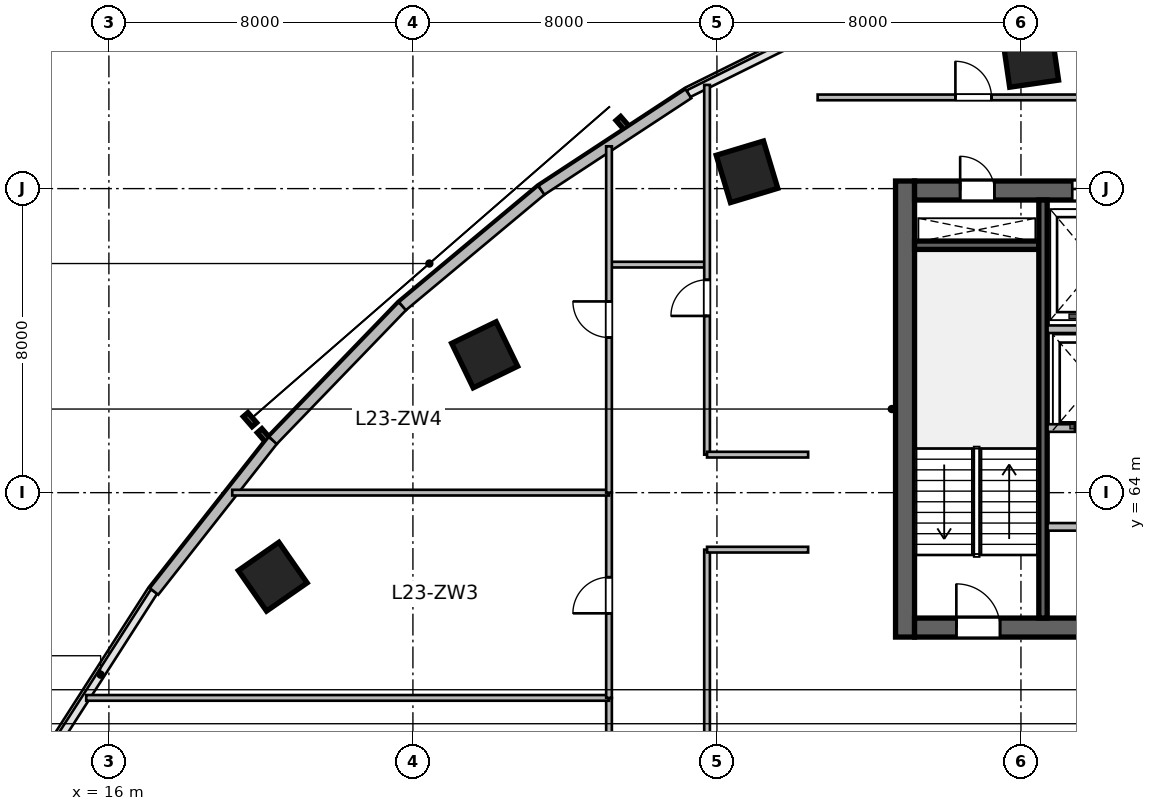
"""IFC4 building model, lengths in metres.
Left out: names, types, materials, properties, quantities, classifications, styles, units other than length and angle.
Written with IfcOpenShell. Run it as: python <this file> out.ifc"""

import sys

from ifc_helpers import new_model, si_unit, direction, frame, frame_2d, origin, origin_2d, place, context, subcontext, project, spatial, rectangle, extrude, source, transform, mapped, element, fill, save


model = new_model("IFC4")
c1 = context("Model", 3, precision=1e-05, world=origin(), true_north=direction((0.0, 1.0)))
c2 = subcontext(c1, "Body", "Model", "MODEL_VIEW")
j1 = project(units=[si_unit("LENGTHUNIT", "METRE"), si_unit("PLANEANGLEUNIT", "RADIAN")], contexts=[c1])
p1 = place(None, origin())
s1 = spatial("IfcSite", under=j1, at=p1, CompositionType="ELEMENT")
p2 = place(p1, origin())
s2 = spatial("IfcBuilding", under=s1, at=p2, CompositionType="ELEMENT")
p3 = place(p2, frame((0.0, 0.0, 99.9)))
s3 = spatial("IfcBuildingStorey", under=s2, at=p3, CompositionType="ELEMENT", Elevation=99.9)
m1 = source(origin(), c2, "Body", "SweptSolid", [
    extrude(rectangle(XDim=12.0, YDim=0.5, at=frame_2d((6.0, 0.0))), origin(), (0.0, 0.0, 1.0), 3.9),
])
p4 = place(p3, frame((36.95, 60.2, 0.0), z_axis=(0.0, 0.0, 1.0), x_axis=(0.0, 1.0, 0.0)))
e1 = element("IfcWall", 1, at=p4, inside=s3, PredefinedType="SHEAR", context=c2, shape_type="MappedRepresentation", body=[
    mapped(m1, transform((0.0, 0.0, 0.0), scale=1.0)),
])
m2 = source(origin(), c2, "Body", "SweptSolid", [
    extrude(rectangle(XDim=21.6, YDim=0.5, at=frame_2d((10.8, 0.0))), origin(), (0.0, 0.0, 1.0), 3.9),
])
p5 = place(p3, frame((37.2, 60.45, 0.0), z_axis=(0.0, 0.0, 1.0), x_axis=(1.0, 0.0, 0.0)))
e2 = element("IfcWall", 2, at=p5, inside=s3, PredefinedType="SHEAR", context=c2, shape_type="MappedRepresentation", body=[
    mapped(m2, transform((0.0, 0.0, 0.0), scale=1.0)),
])
p6 = place(p5, frame((1.1, 0.0, 0.0)))
e3 = element("IfcOpeningElement", 3, at=p6, cuts=e2, PredefinedType="OPENING", context=c2, shape_type="SweptSolid", body=[
    extrude(rectangle(XDim=1.15, YDim=2.15, at=frame_2d((0.575, 1.075))), frame((0.0, 0.26, 0.0), z_axis=(0.0, -1.0, 0.0), x_axis=(1.0, 0.0, 0.0)), (0.0, 0.0, 1.0), 0.52),
])
p7 = place(p5, frame((19.5, 0.0, 0.0)))
e4 = element("IfcOpeningElement", 4, at=p7, cuts=e2, PredefinedType="OPENING", context=c2, shape_type="SweptSolid", body=[
    extrude(rectangle(XDim=0.9, YDim=2.1, at=frame_2d((0.45, 1.05))), frame((0.0, 0.26, 0.0), z_axis=(0.0, -1.0, 0.0), x_axis=(1.0, 0.0, 0.0)), (0.0, 0.0, 1.0), 0.52),
])
p8 = place(p5, frame((12.02, 0.0, 0.0)))
e5 = element("IfcOpeningElement", 5, at=p8, cuts=e2, PredefinedType="OPENING", context=c2, shape_type="SweptSolid", body=[
    extrude(rectangle(XDim=1.6, YDim=2.15, at=frame_2d((0.8, 1.075))), frame((0.0, 0.26, 0.0), z_axis=(0.0, -1.0, 0.0), x_axis=(1.0, 0.0, 0.0)), (0.0, 0.0, 1.0), 0.52),
])
p9 = place(p3, frame((37.2, 71.95, 0.0), z_axis=(0.0, 0.0, 1.0), x_axis=(1.0, 0.0, 0.0)))
e6 = element("IfcWall", 6, at=p9, inside=s3, PredefinedType="SHEAR", context=c2, shape_type="MappedRepresentation", body=[
    mapped(m2, transform((0.0, 0.0, 0.0), scale=1.0)),
])
p10 = place(p9, frame((1.2, 0.0, 0.0)))
e7 = element("IfcOpeningElement", 7, at=p10, cuts=e6, PredefinedType="OPENING", context=c2, shape_type="SweptSolid", body=[
    extrude(rectangle(XDim=0.9, YDim=2.1, at=frame_2d((0.45, 1.05))), frame((0.0, 0.26, 0.0), z_axis=(0.0, -1.0, 0.0), x_axis=(1.0, 0.0, 0.0)), (0.0, 0.0, 1.0), 0.52),
])
p11 = place(p9, frame((14.7, 0.0, 0.0)))
e8 = element("IfcOpeningElement", 8, at=p11, cuts=e6, PredefinedType="OPENING", context=c2, shape_type="SweptSolid", body=[
    extrude(rectangle(XDim=1.2, YDim=2.15, at=frame_2d((0.6, 1.075))), frame((0.0, 0.26, 0.0), z_axis=(0.0, -1.0, 0.0), x_axis=(1.0, 0.0, 0.0)), (0.0, 0.0, 1.0), 0.52),
])
p12 = place(p9, frame((4.15, 0.0, 0.0)))
e9 = element("IfcOpeningElement", 9, at=p12, cuts=e6, PredefinedType="OPENING", context=c2, shape_type="SweptSolid", body=[
    extrude(rectangle(XDim=1.3, YDim=2.15, at=frame_2d((0.65, 1.075))), frame((0.0, 0.26, 0.0), z_axis=(0.0, -1.0, 0.0), x_axis=(1.0, 0.0, 0.0)), (0.0, 0.0, 1.0), 0.52),
])
p13 = place(p9, frame((7.1, 0.0, 0.0)))
e10 = element("IfcOpeningElement", 10, at=p13, cuts=e6, PredefinedType="OPENING", context=c2, shape_type="SweptSolid", body=[
    extrude(rectangle(XDim=0.9, YDim=2.1, at=frame_2d((0.45, 1.05))), frame((0.0, 0.26, 0.0), z_axis=(0.0, -1.0, 0.0), x_axis=(1.0, 0.0, 0.0)), (0.0, 0.0, 1.0), 0.52),
])
m3 = source(origin(), c2, "Body", "SweptSolid", [
    extrude(rectangle(XDim=3.27, YDim=0.22, at=frame_2d((1.635, 0.0))), origin(), (0.0, 0.0, 1.0), 3.9),
])
p14 = place(p3, frame((37.2, 70.51, 0.0), z_axis=(0.0, 0.0, 1.0), x_axis=(1.0, 0.0, 0.0)))
e11 = element("IfcWall", 11, at=p14, inside=s3, PredefinedType="SHEAR", context=c2, shape_type="MappedRepresentation", body=[
    mapped(m3, transform((0.0, 0.0, 0.0), scale=1.0)),
])
m4 = source(origin(), c2, "Body", "SweptSolid", [
    extrude(rectangle(XDim=11.0, YDim=0.22, at=frame_2d((5.5, 0.0))), origin(), (0.0, 0.0, 1.0), 3.9),
])
p15 = place(p3, frame((40.58, 60.7, 0.0), z_axis=(0.0, 0.0, 1.0), x_axis=(0.0, 1.0, 0.0)))
e12 = element("IfcWall", 12, at=p15, inside=s3, PredefinedType="SHEAR", context=c2, shape_type="MappedRepresentation", body=[
    mapped(m4, transform((0.0, 0.0, 0.0), scale=1.0)),
])
m5 = source(origin(), c2, "Body", "SweptSolid", [
    extrude(rectangle(XDim=1.3, YDim=1.3, at=origin_2d()), origin(), (0.0, 0.0, 1.0), 3.9),
])
for number, where, z_axis, x_axis in (
    (13, (20.311, 61.789, 0.0), (0.0, 0.0, 1.0), (-0.571, 0.821, 0.0)),
    (14, (25.888, 67.627, 0.0), (0.0, 0.0, 1.0), (-0.436, 0.9, 0.0)),
    (15, (32.791, 72.442, 0.0), (0.0, 0.0, 1.0), (-0.289, 0.957, 0.0)),
    (16, (40.253, 75.404, 0.0), (0.0, 0.0, 1.0), (-0.143, 0.99, 0.0)),
):
    element("IfcColumn", number, at=place(p3, frame(where, z_axis=z_axis, x_axis=x_axis)), inside=s3, PredefinedType="COLUMN", context=c2, shape_type="MappedRepresentation", body=[
        mapped(m5, transform((0.0, 0.0, 0.0), scale=1.0)),
    ])
m6 = source(origin(), c2, "Body", "SweptSolid", [
    extrude(rectangle(XDim=5.058, YDim=0.28, at=frame_2d((2.529, 0.0))), origin(), (0.0, 0.0, 1.0), 3.65),
])
p16 = place(p3, frame((17.188, 61.4, 0.0), z_axis=(0.0, 0.0, 1.0), x_axis=(0.618145507434, 0.786063694391, 0.0)))
e17 = element("IfcWall", 17, at=p16, inside=s3, PredefinedType="SOLIDWALL", context=c2, shape_type="MappedRepresentation", body=[
    mapped(m6, transform((0.0, 0.0, 0.0), scale=1.0)),
])
m7 = source(origin(), c2, "Body", "SweptSolid", [
    extrude(rectangle(XDim=4.908, YDim=0.28, at=frame_2d((2.454, 0.0))), origin(), (0.0, 0.0, 1.0), 3.65),
])
p17 = place(p3, frame((20.315, 65.376, 0.0), z_axis=(0.0, 0.0, 1.0), x_axis=(0.694613154328, 0.719383462302, 0.0)))
e18 = element("IfcWall", 18, at=p17, inside=s3, PredefinedType="SOLIDWALL", context=c2, shape_type="MappedRepresentation", body=[
    mapped(m7, transform((0.0, 0.0, 0.0), scale=1.0)),
])
m8 = source(origin(), c2, "Body", "SweptSolid", [
    extrude(rectangle(XDim=4.762, YDim=0.28, at=frame_2d((2.381, 0.0))), origin(), (0.0, 0.0, 1.0), 3.65),
])
p18 = place(p3, frame((23.725, 68.907, 0.0), z_axis=(0.0, 0.0, 1.0), x_axis=(0.767952279762, 0.640507061638, 0.0)))
e19 = element("IfcWall", 19, at=p18, inside=s3, PredefinedType="SOLIDWALL", context=c2, shape_type="MappedRepresentation", body=[
    mapped(m8, transform((0.0, 0.0, 0.0), scale=1.0)),
])
m9 = source(origin(), c2, "Body", "SweptSolid", [
    extrude(rectangle(XDim=4.626, YDim=0.28, at=frame_2d((2.313, 0.0))), origin(), (0.0, 0.0, 1.0), 3.65),
])
p19 = place(p3, frame((27.382, 71.958, 0.0), z_axis=(0.0, 0.0, 1.0), x_axis=(0.83595938331, 0.548791316855, 0.0)))
e20 = element("IfcWall", 20, at=p19, inside=s3, PredefinedType="SOLIDWALL", context=c2, shape_type="MappedRepresentation", body=[
    mapped(m9, transform((0.0, 0.0, 0.0), scale=1.0)),
])
m10 = source(origin(), c2, "Body", "SweptSolid", [
    extrude(rectangle(XDim=8.8, YDim=0.2, at=frame_2d((4.4, 0.0))), origin(), (0.0, 0.0, 1.0), 3.65),
])
p20 = place(p3, frame((40.7, 68.3, 0.0), z_axis=(0.0, 0.0, 1.0), x_axis=(1.0, 0.0, 0.0)))
e21 = element("IfcWall", 21, at=p20, inside=s3, PredefinedType="SOLIDWALL", context=c2, shape_type="MappedRepresentation", body=[
    mapped(m10, transform((0.0, 0.0, 0.0), scale=1.0)),
])
m11 = source(origin(), c2, "Body", "SweptSolid", [
    extrude(rectangle(XDim=8.02, YDim=0.2, at=frame_2d((4.01, 0.0))), origin(), (0.0, 0.0, 1.0), 3.65),
])
p21 = place(p3, frame((40.7, 63.1, 0.0), z_axis=(0.0, 0.0, 1.0), x_axis=(1.0, 0.0, 0.0)))
e22 = element("IfcWall", 22, at=p21, inside=s3, PredefinedType="SOLIDWALL", context=c2, shape_type="MappedRepresentation", body=[
    mapped(m11, transform((0.0, 0.0, 0.0), scale=1.0)),
])
p22 = place(p21, frame((3.4, 0.0, 0.0)))
e23 = element("IfcOpeningElement", 23, at=p22, cuts=e22, PredefinedType="OPENING", context=c2, shape_type="SweptSolid", body=[
    extrude(rectangle(XDim=0.95, YDim=2.15, at=frame_2d((0.475, 1.075))), frame((0.0, 0.11, 0.0), z_axis=(0.0, -1.0, 0.0), x_axis=(1.0, 0.0, 0.0)), (0.0, 0.0, 1.0), 0.22),
])
p23 = place(p3, frame((40.7, 65.7, 0.0), z_axis=(0.0, 0.0, 1.0), x_axis=(1.0, 0.0, 0.0)))
e24 = element("IfcWall", 24, at=p23, inside=s3, PredefinedType="SOLIDWALL", context=c2, shape_type="MappedRepresentation", body=[
    mapped(m10, transform((0.0, 0.0, 0.0), scale=1.0)),
])
p24 = place(p23, frame((0.72, 0.0, 0.0)))
e25 = element("IfcOpeningElement", 25, at=p24, cuts=e24, PredefinedType="OPENING", context=c2, shape_type="SweptSolid", body=[
    extrude(rectangle(XDim=1.0, YDim=2.15, at=frame_2d((0.5, 1.075))), frame((0.0, 0.11, 0.0), z_axis=(0.0, -1.0, 0.0), x_axis=(1.0, 0.0, 0.0)), (0.0, 0.0, 1.0), 0.22),
])
p25 = place(p23, frame((2.62, 0.0, 0.0)))
e26 = element("IfcOpeningElement", 26, at=p25, cuts=e24, PredefinedType="OPENING", context=c2, shape_type="SweptSolid", body=[
    extrude(rectangle(XDim=1.0, YDim=2.15, at=frame_2d((0.5, 1.075))), frame((0.0, 0.11, 0.0), z_axis=(0.0, -1.0, 0.0), x_axis=(1.0, 0.0, 0.0)), (0.0, 0.0, 1.0), 0.22),
])
p26 = place(p23, frame((4.55, 0.0, 0.0)))
e27 = element("IfcOpeningElement", 27, at=p26, cuts=e24, PredefinedType="OPENING", context=c2, shape_type="SweptSolid", body=[
    extrude(rectangle(XDim=1.0, YDim=2.15, at=frame_2d((0.5, 1.075))), frame((0.0, 0.11, 0.0), z_axis=(0.0, -1.0, 0.0), x_axis=(1.0, 0.0, 0.0)), (0.0, 0.0, 1.0), 0.22),
])
p27 = place(p23, frame((6.55, 0.0, 0.0)))
e28 = element("IfcOpeningElement", 28, at=p27, cuts=e24, PredefinedType="OPENING", context=c2, shape_type="SweptSolid", body=[
    extrude(rectangle(XDim=1.0, YDim=2.15, at=frame_2d((0.5, 1.075))), frame((0.0, 0.11, 0.0), z_axis=(0.0, -1.0, 0.0), x_axis=(1.0, 0.0, 0.0)), (0.0, 0.0, 1.0), 0.22),
])
m12 = source(origin(), c2, "Body", "SweptSolid", [
    extrude(rectangle(XDim=2.5, YDim=0.15, at=frame_2d((1.25, 0.0))), origin(), (0.0, 0.0, 1.0), 3.022),
])
p28 = place(p3, frame((29.2, 70.0, 0.0), z_axis=(0.0, 0.0, 1.0), x_axis=(1.0, 0.0, 0.0)))
e29 = element("IfcWall", 29, at=p28, inside=s3, PredefinedType="PARTITIONING", context=c2, shape_type="MappedRepresentation", body=[
    mapped(m12, transform((0.0, 0.0, 0.0), scale=1.0)),
])
m13 = source(origin(), c2, "Body", "SweptSolid", [
    extrude(rectangle(XDim=5.4, YDim=0.15, at=frame_2d((2.7, 0.0))), origin(), (0.0, 0.0, 1.0), 3.022),
])
p29 = place(p3, frame((29.16, 53.2, 0.0), z_axis=(0.0, 0.0, 1.0), x_axis=(0.0, 1.0, 0.0)))
e30 = element("IfcWall", 30, at=p29, inside=s3, PredefinedType="PARTITIONING", context=c2, shape_type="MappedRepresentation", body=[
    mapped(m13, transform((0.0, 0.0, 0.0), scale=1.0)),
])
p30 = place(p29, frame((2.225, 0.0, 0.0)))
e31 = element("IfcOpeningElement", 31, at=p30, cuts=e30, PredefinedType="OPENING", context=c2, shape_type="SweptSolid", body=[
    extrude(rectangle(XDim=0.95, YDim=2.1, at=frame_2d((0.475, 1.05))), frame((0.0, 0.085, 0.0), z_axis=(0.0, -1.0, 0.0), x_axis=(1.0, 0.0, 0.0)), (0.0, 0.0, 1.0), 0.17),
])
m14 = source(origin(), c2, "Body", "SweptSolid", [
    extrude(rectangle(XDim=13.757, YDim=0.15, at=frame_2d((6.878, 0.0))), origin(), (0.0, 0.0, 1.0), 3.65),
])
p31 = place(p3, frame((15.403, 58.6, 0.0), z_axis=(0.0, 0.0, 1.0), x_axis=(1.0, 0.0, 0.0)))
e32 = element("IfcWall", 32, at=p31, inside=s3, PredefinedType="PARTITIONING", context=c2, shape_type="MappedRepresentation", body=[
    mapped(m14, transform((0.0, 0.0, 0.0), scale=1.0)),
])
m15 = source(origin(), c2, "Body", "SweptSolid", [
    extrude(rectangle(XDim=5.4, YDim=0.15, at=frame_2d((2.7, 0.0))), origin(), (0.0, 0.0, 1.0), 2.942),
])
p32 = place(p3, frame((29.16, 58.6, 0.0), z_axis=(0.0, 0.0, 1.0), x_axis=(0.0, 1.0, 0.0)))
e33 = element("IfcWall", 33, at=p32, inside=s3, PredefinedType="PARTITIONING", context=c2, shape_type="MappedRepresentation", body=[
    mapped(m15, transform((0.0, 0.0, 0.0), scale=1.0)),
])
p33 = place(p32, frame((2.225, 0.0, 0.0)))
e34 = element("IfcOpeningElement", 34, at=p33, cuts=e33, PredefinedType="OPENING", context=c2, shape_type="SweptSolid", body=[
    extrude(rectangle(XDim=0.95, YDim=2.1, at=frame_2d((0.475, 1.05))), frame((0.0, 0.085, 0.0), z_axis=(0.0, -1.0, 0.0), x_axis=(1.0, 0.0, 0.0)), (0.0, 0.0, 1.0), 0.17),
])
m16 = source(origin(), c2, "Body", "SweptSolid", [
    extrude(rectangle(XDim=9.914, YDim=0.15, at=frame_2d((4.957, 0.0))), origin(), (0.0, 0.0, 1.0), 3.65),
])
p34 = place(p3, frame((19.246, 64.0, 0.0), z_axis=(0.0, 0.0, 1.0), x_axis=(1.0, 0.0, 0.0)))
e35 = element("IfcWall", 35, at=p34, inside=s3, PredefinedType="PARTITIONING", context=c2, shape_type="MappedRepresentation", body=[
    mapped(m16, transform((0.0, 0.0, 0.0), scale=1.0)),
])
m17 = source(origin(), c2, "Body", "SweptSolid", [
    extrude(rectangle(XDim=9.113, YDim=0.15, at=frame_2d((4.557, 0.0))), origin(), (0.0, 0.0, 1.0), 3.65),
])
p35 = place(p3, frame((29.16, 64.0, 0.0), z_axis=(0.0, 0.0, 1.0), x_axis=(0.0, 1.0, 0.0)))
e36 = element("IfcWall", 36, at=p35, inside=s3, PredefinedType="PARTITIONING", context=c2, shape_type="MappedRepresentation", body=[
    mapped(m17, transform((0.0, 0.0, 0.0), scale=1.0)),
])
p36 = place(p35, frame((4.082, 0.0, 0.0)))
e37 = element("IfcOpeningElement", 37, at=p36, cuts=e36, PredefinedType="OPENING", context=c2, shape_type="SweptSolid", body=[
    extrude(rectangle(XDim=0.95, YDim=2.1, at=frame_2d((0.475, 1.05))), frame((0.0, 0.085, 0.0), z_axis=(0.0, -1.0, 0.0), x_axis=(1.0, 0.0, 0.0)), (0.0, 0.0, 1.0), 0.17),
])
m18 = source(origin(), c2, "Body", "SweptSolid", [
    extrude(rectangle(XDim=8.2, YDim=0.15, at=frame_2d((4.1, 0.0))), origin(), (0.0, 0.0, 1.0), 3.022),
])
p37 = place(p3, frame((34.65, 74.4, 0.0), z_axis=(0.0, 0.0, 1.0), x_axis=(1.0, 0.0, 0.0)))
e38 = element("IfcWall", 38, at=p37, inside=s3, PredefinedType="PARTITIONING", context=c2, shape_type="MappedRepresentation", body=[
    mapped(m18, transform((0.0, 0.0, 0.0), scale=1.0)),
])
p38 = place(p37, frame((3.625, 0.0, 0.0)))
e39 = element("IfcOpeningElement", 39, at=p38, cuts=e38, PredefinedType="OPENING", context=c2, shape_type="SweptSolid", body=[
    extrude(rectangle(XDim=0.95, YDim=2.1, at=frame_2d((0.475, 1.05))), frame((0.0, 0.085, 0.0), z_axis=(0.0, -1.0, 0.0), x_axis=(1.0, 0.0, 0.0)), (0.0, 0.0, 1.0), 0.17),
])
m19 = source(origin(), c2, "Body", "SweptSolid", [
    extrude(rectangle(XDim=17.974, YDim=0.15, at=frame_2d((8.987, 0.0))), origin(), (0.0, 0.0, 1.0), 2.942),
])
p39 = place(p3, frame((31.74, 44.526, 0.0), z_axis=(0.0, 0.0, 1.0), x_axis=(0.0, 1.0, 0.0)))
e40 = element("IfcWall", 40, at=p39, inside=s3, PredefinedType="PARTITIONING", context=c2, shape_type="MappedRepresentation", body=[
    mapped(m19, transform((0.0, 0.0, 0.0), scale=1.0)),
])
p40 = place(p39, frame((8.512, 0.0, 0.0)))
e41 = element("IfcOpeningElement", 41, at=p40, cuts=e40, PredefinedType="OPENING", context=c2, shape_type="SweptSolid", body=[
    extrude(rectangle(XDim=0.95, YDim=2.1, at=frame_2d((0.475, 1.05))), frame((0.0, 0.085, 0.0), z_axis=(0.0, -1.0, 0.0), x_axis=(1.0, 0.0, 0.0)), (0.0, 0.0, 1.0), 0.17),
])
m20 = source(origin(), c2, "Body", "SweptSolid", [
    extrude(rectangle(XDim=2.66, YDim=0.15, at=frame_2d((1.33, 0.0))), origin(), (0.0, 0.0, 1.0), 3.65),
])
p41 = place(p3, frame((31.74, 62.5, 0.0), z_axis=(0.0, 0.0, 1.0), x_axis=(1.0, 0.0, 0.0)))
e42 = element("IfcWall", 42, at=p41, inside=s3, PredefinedType="PARTITIONING", context=c2, shape_type="MappedRepresentation", body=[
    mapped(m20, transform((0.0, 0.0, 0.0), scale=1.0)),
])
m21 = source(origin(), c2, "Body", "SweptSolid", [
    extrude(rectangle(XDim=9.729, YDim=0.15, at=frame_2d((4.864, 0.0))), origin(), (0.0, 0.0, 1.0), 3.65),
])
p42 = place(p3, frame((31.74, 65.0, 0.0), z_axis=(0.0, 0.0, 1.0), x_axis=(0.0, 1.0, 0.0)))
e43 = element("IfcWall", 43, at=p42, inside=s3, PredefinedType="PARTITIONING", context=c2, shape_type="MappedRepresentation", body=[
    mapped(m21, transform((0.0, 0.0, 0.0), scale=1.0)),
])
p43 = place(p42, frame((3.65, 0.0, 0.0)))
e44 = element("IfcOpeningElement", 44, at=p43, cuts=e43, PredefinedType="OPENING", context=c2, shape_type="SweptSolid", body=[
    extrude(rectangle(XDim=0.95, YDim=2.1, at=frame_2d((0.475, 1.05))), frame((0.0, 0.085, 0.0), z_axis=(0.0, -1.0, 0.0), x_axis=(1.0, 0.0, 0.0)), (0.0, 0.0, 1.0), 0.17),
])
p44 = place(p3, frame((31.74, 65.0, 0.0), z_axis=(0.0, 0.0, 1.0), x_axis=(1.0, 0.0, 0.0)))
e45 = element("IfcWall", 45, at=p44, inside=s3, PredefinedType="PARTITIONING", context=c2, shape_type="MappedRepresentation", body=[
    mapped(m20, transform((0.0, 0.0, 0.0), scale=1.0)),
])
m22 = source(origin(), c2, "Body", "SweptSolid", [
    extrude(rectangle(XDim=1.15, YDim=2.15, at=frame_2d((0.575, 1.075))), frame((0.0, 0.025, 0.0), z_axis=(0.0, -1.0, 0.0), x_axis=(1.0, 0.0, 0.0)), (0.0, 0.0, 1.0), 0.05),
])
p45 = place(p6, origin())
e46 = element("IfcDoor", 46, at=p45, inside=s3, OperationType="SINGLE_SWING_LEFT", PredefinedType="DOOR", context=c2, shape_type="MappedRepresentation", body=[
    mapped(m22, transform((0.0, 0.0, 0.0), scale=1.0)),
])
fill(e3, e46)
m23 = source(origin(), c2, "Body", "SweptSolid", [
    extrude(rectangle(XDim=0.9, YDim=2.1, at=frame_2d((0.45, 1.05))), frame((0.0, 0.025, 0.0), z_axis=(0.0, -1.0, 0.0), x_axis=(1.0, 0.0, 0.0)), (0.0, 0.0, 1.0), 0.05),
])
p46 = place(p10, origin())
e47 = element("IfcDoor", 47, at=p46, inside=s3, OperationType="SINGLE_SWING_LEFT", PredefinedType="DOOR", context=c2, shape_type="MappedRepresentation", body=[
    mapped(m23, transform((0.0, 0.0, 0.0), scale=1.0)),
])
fill(e7, e47)
m24 = source(origin(), c2, "Body", "SweptSolid", [
    extrude(rectangle(XDim=1.3, YDim=2.15, at=frame_2d((0.65, 1.075))), frame((0.0, 0.025, 0.0), z_axis=(0.0, -1.0, 0.0), x_axis=(1.0, 0.0, 0.0)), (0.0, 0.0, 1.0), 0.05),
])
p47 = place(p12, origin())
e48 = element("IfcDoor", 48, at=p47, inside=s3, OperationType="DOUBLE_DOOR_SLIDING", PredefinedType="DOOR", context=c2, shape_type="MappedRepresentation", body=[
    mapped(m24, transform((0.0, 0.0, 0.0), scale=1.0)),
])
fill(e9, e48)
m25 = source(origin(), c2, "Body", "SweptSolid", [
    extrude(rectangle(XDim=1.0, YDim=2.15, at=frame_2d((0.5, 1.075))), frame((0.0, 0.025, 0.0), z_axis=(0.0, -1.0, 0.0), x_axis=(1.0, 0.0, 0.0)), (0.0, 0.0, 1.0), 0.05),
])
p48 = place(p24, origin())
e49 = element("IfcDoor", 49, at=p48, inside=s3, OperationType="DOUBLE_DOOR_SLIDING", PredefinedType="DOOR", context=c2, shape_type="MappedRepresentation", body=[
    mapped(m25, transform((0.0, 0.0, 0.0), scale=1.0)),
])
fill(e25, e49)
m26 = source(origin(), c2, "Body", "SweptSolid", [
    extrude(rectangle(XDim=0.95, YDim=2.1, at=frame_2d((0.475, 1.05))), frame((0.0, 0.025, 0.0), z_axis=(0.0, -1.0, 0.0), x_axis=(1.0, 0.0, 0.0)), (0.0, 0.0, 1.0), 0.05),
])
p49 = place(p33, origin())
e50 = element("IfcDoor", 50, at=p49, inside=s3, OperationType="SINGLE_SWING_LEFT", PredefinedType="DOOR", context=c2, shape_type="MappedRepresentation", body=[
    mapped(m26, transform((0.0, 0.0, 0.0), scale=1.0)),
])
fill(e34, e50)
p50 = place(p36, origin())
e51 = element("IfcDoor", 51, at=p50, inside=s3, OperationType="SINGLE_SWING_RIGHT", PredefinedType="DOOR", context=c2, shape_type="MappedRepresentation", body=[
    mapped(m26, transform((0.0, 0.0, 0.0), scale=1.0)),
])
fill(e37, e51)
p51 = place(p38, origin())
e52 = element("IfcDoor", 52, at=p51, inside=s3, OperationType="SINGLE_SWING_LEFT", PredefinedType="DOOR", context=c2, shape_type="MappedRepresentation", body=[
    mapped(m26, transform((0.0, 0.0, 0.0), scale=1.0)),
])
fill(e39, e52)
p52 = place(p43, origin())
e53 = element("IfcDoor", 53, at=p52, inside=s3, OperationType="SINGLE_SWING_LEFT", PredefinedType="DOOR", context=c2, shape_type="MappedRepresentation", body=[
    mapped(m26, transform((0.0, 0.0, 0.0), scale=1.0)),
])
fill(e44, e53)
save(model, sys.argv[1])
